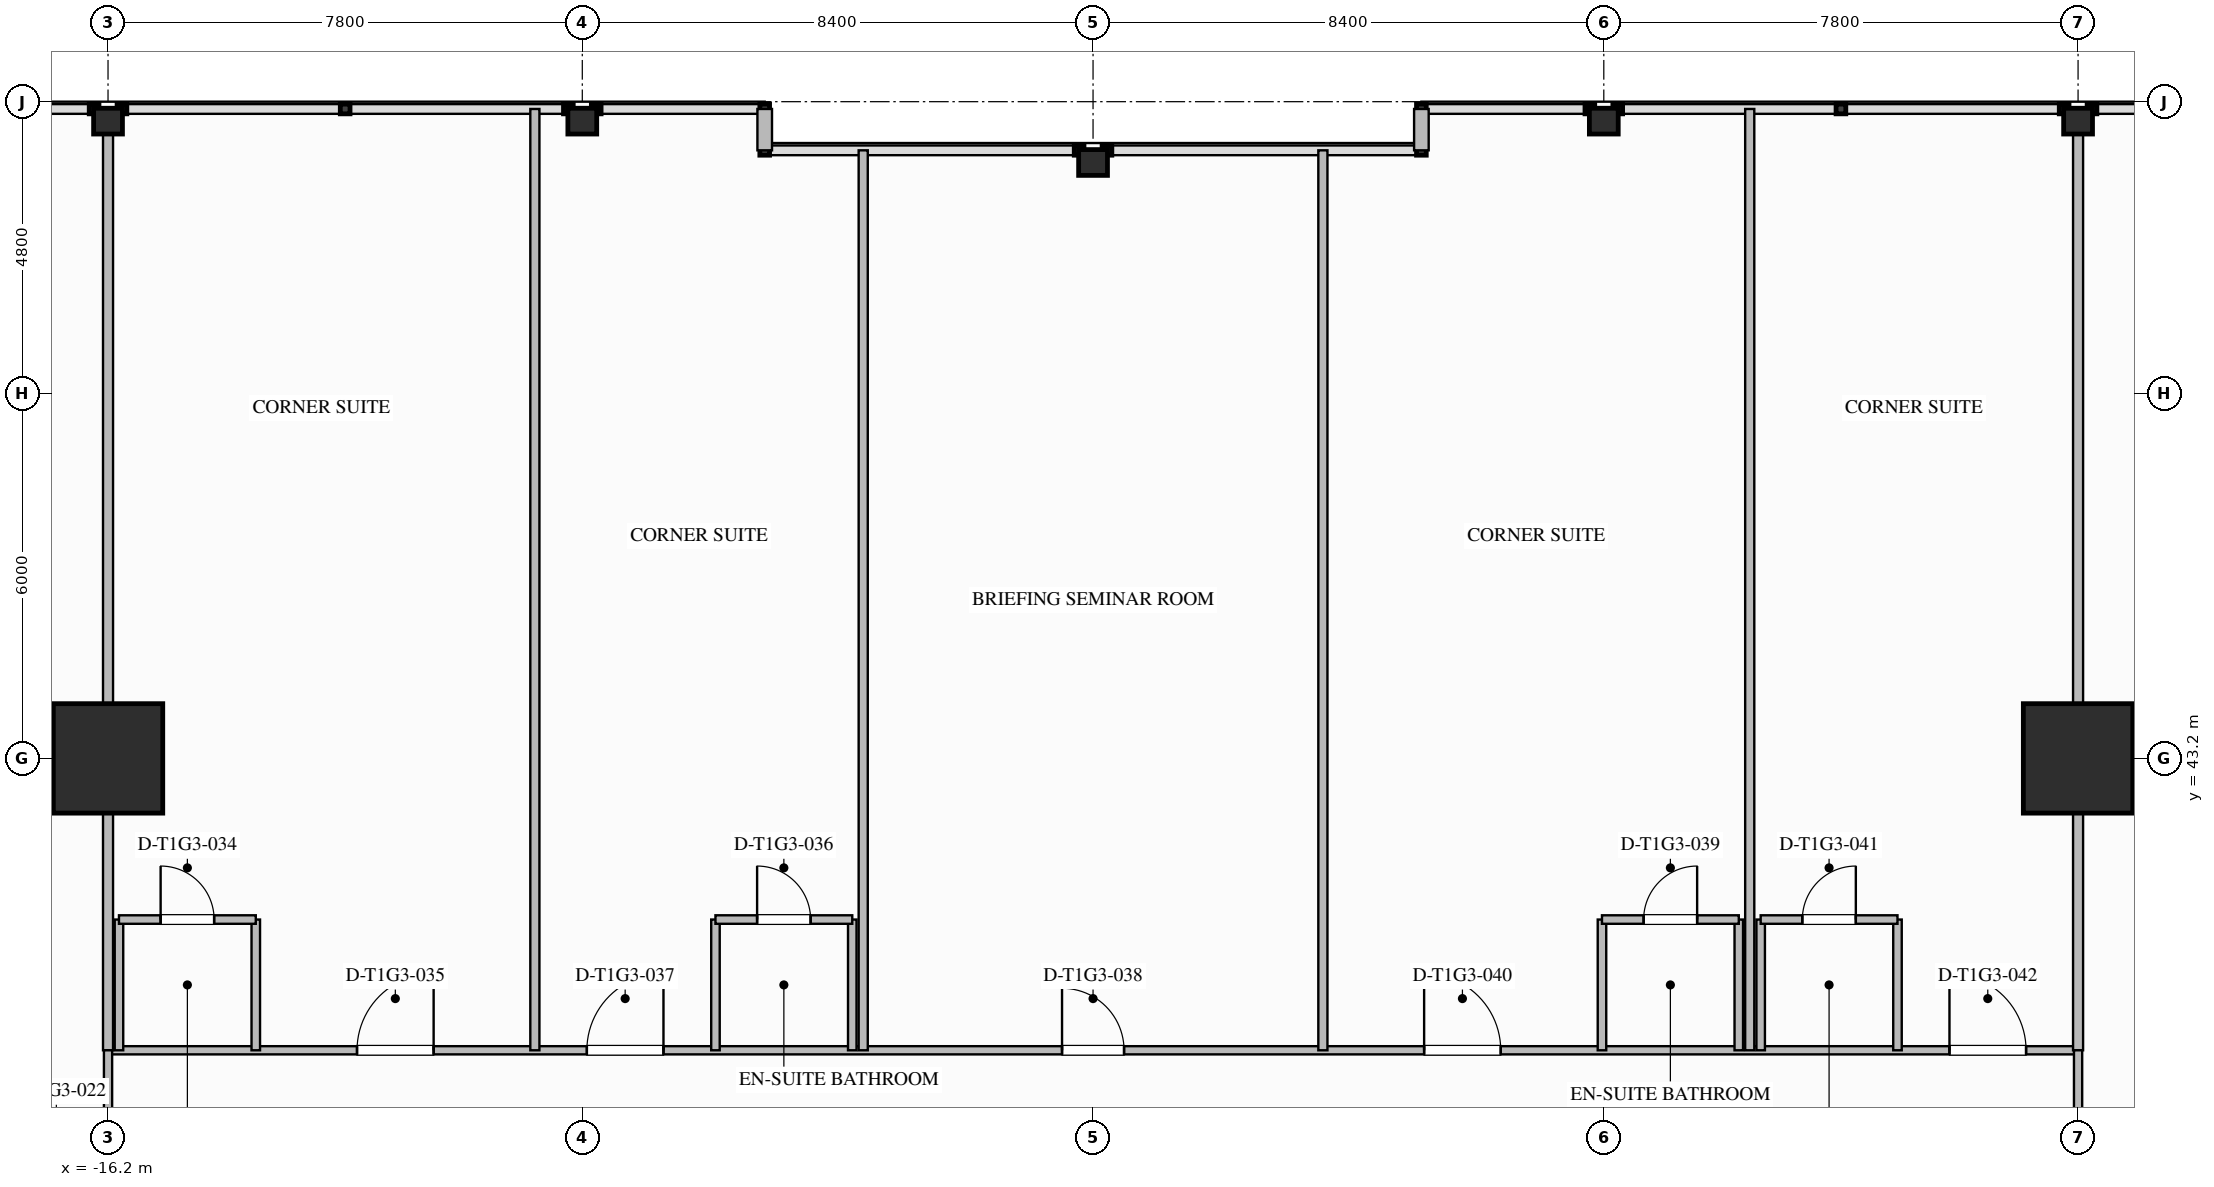
"""IFC4 building model, lengths in metres.
Left out: names, types, materials, properties, quantities, classifications, styles, units other than length and angle.
Written with IfcOpenShell. Run it as: python <this file> out.ifc"""

import sys

from ifc_helpers import new_model, si_unit, direction, frame, frame_2d, origin, origin_2d, place, context, subcontext, project, spatial, rectangle, i_section, extrude, element, fill, save


model = new_model("IFC4")
c1 = context("Model", 3, precision=1e-05, world=origin(), true_north=direction((0.0, 1.0)))
c2 = subcontext(c1, "Body", "Model", "MODEL_VIEW")
j1 = project(units=[si_unit("LENGTHUNIT", "METRE"), si_unit("PLANEANGLEUNIT", "RADIAN")], contexts=[c1])
p1 = place(None, origin())
s1 = spatial("IfcSite", under=j1, at=p1, CompositionType="ELEMENT")
p2 = place(p1, origin())
s2 = spatial("IfcBuilding", under=s1, at=p2, CompositionType="ELEMENT")
p3 = place(p2, frame((0.0, 0.0, 61.2)))
s3 = spatial("IfcBuildingStorey", under=s2, at=p3, CompositionType="ELEMENT", Elevation=61.2)
for number, where, z_axis, x_axis in (
    (1, (-16.2, 43.2, 0.0), (0.0, 0.0, 1.0), (1.0, 0.0, 0.0)),
    (2, (16.2, 43.2, 0.0), (0.0, 0.0, 1.0), (1.0, 0.0, 0.0)),
):
    element("IfcColumn", number, at=place(p3, frame(where, z_axis=z_axis, x_axis=x_axis)), inside=s3, PredefinedType="COLUMN", context=c2, shape_type="SweptSolid", body=[
        extrude(rectangle(XDim=1.8, YDim=1.8, at=origin_2d()), origin(), (0.0, 0.0, 1.0), 3.5),
    ])
for number, where, z_axis, x_axis in (
    (3, (-16.2, 53.68, 0.0), (0.0, 0.0, 1.0), (0.0, 1.0, 0.0)),
    (4, (-8.4, 53.68, 0.0), (0.0, 0.0, 1.0), (0.0, 1.0, 0.0)),
    (5, (0.0, 53.0, 0.0), (0.0, 0.0, 1.0), (0.0, 1.0, 0.0)),
    (6, (8.4, 53.68, 0.0), (0.0, 0.0, 1.0), (0.0, 1.0, 0.0)),
    (7, (16.2, 53.68, 0.0), (0.0, 0.0, 1.0), (0.0, 1.0, 0.0)),
):
    element("IfcColumn", number, at=place(p3, frame(where, z_axis=z_axis, x_axis=x_axis)), inside=s3, PredefinedType="COLUMN", context=c2, shape_type="SweptSolid", body=[
        extrude(i_section(OverallWidth=0.424, OverallDepth=0.474, WebThickness=0.048, FlangeThickness=0.077, FilletRadius=0.03, at=origin_2d()), origin(), (0.0, 0.0, 1.0), 3.497),
    ])
for number, where, z_axis, x_axis in (
    (8, (-5.4, 53.88, 0.0), (0.0, 0.0, 1.0), (0.0, -1.0, 0.0)),
    (9, (5.4, 53.2, 0.0), (0.0, 0.0, 1.0), (0.0, 1.0, 0.0)),
):
    element("IfcWall", number, at=place(p3, frame(where, z_axis=z_axis, x_axis=x_axis)), inside=s3, PredefinedType="STANDARD", context=c2, shape_type="SweptSolid", body=[
        extrude(rectangle(XDim=0.68, YDim=0.24, at=frame_2d((0.34, 0.0))), origin(), (0.0, 0.0, 1.0), 3.24),
    ])
p4 = place(p3, frame((-16.2, 38.4, 0.0), z_axis=(0.0, 0.0, 1.0), x_axis=(1.0, 0.0, 0.0)))
e10 = element("IfcWall", 10, at=p4, inside=s3, PredefinedType="PARTITIONING", context=c2, shape_type="SweptSolid", body=[
    extrude(rectangle(XDim=32.4, YDim=0.135, at=frame_2d((16.2, 0.0))), origin(), (0.0, 0.0, 1.0), 3.24),
])
p5 = place(p4, frame((4.095, 0.0, 0.0)))
e11 = element("IfcOpeningElement", 11, at=p5, cuts=e10, PredefinedType="OPENING", context=c2, shape_type="SweptSolid", body=[
    extrude(rectangle(XDim=1.26, YDim=2.2, at=frame_2d((0.63, 1.1))), frame((0.0, 0.077, 0.0), z_axis=(0.0, -1.0, 0.0), x_axis=(1.0, 0.0, 0.0)), (0.0, 0.0, 1.0), 0.155),
])
p6 = place(p4, frame((7.875, 0.0, 0.0)))
e12 = element("IfcOpeningElement", 12, at=p6, cuts=e10, PredefinedType="OPENING", context=c2, shape_type="SweptSolid", body=[
    extrude(rectangle(XDim=1.26, YDim=2.2, at=frame_2d((0.63, 1.1))), frame((0.0, 0.077, 0.0), z_axis=(0.0, -1.0, 0.0), x_axis=(1.0, 0.0, 0.0)), (0.0, 0.0, 1.0), 0.155),
])
p7 = place(p4, frame((15.69, 0.0, 0.0)))
e13 = element("IfcOpeningElement", 13, at=p7, cuts=e10, PredefinedType="OPENING", context=c2, shape_type="SweptSolid", body=[
    extrude(rectangle(XDim=1.02, YDim=2.15, at=frame_2d((0.51, 1.075))), frame((0.0, 0.077, 0.0), z_axis=(0.0, -1.0, 0.0), x_axis=(1.0, 0.0, 0.0)), (0.0, 0.0, 1.0), 0.155),
])
p8 = place(p4, frame((21.645, 0.0, 0.0)))
e14 = element("IfcOpeningElement", 14, at=p8, cuts=e10, PredefinedType="OPENING", context=c2, shape_type="SweptSolid", body=[
    extrude(rectangle(XDim=1.26, YDim=2.2, at=frame_2d((0.63, 1.1))), frame((0.0, 0.077, 0.0), z_axis=(0.0, -1.0, 0.0), x_axis=(1.0, 0.0, 0.0)), (0.0, 0.0, 1.0), 0.155),
])
p9 = place(p4, frame((30.285, 0.0, 0.0)))
e15 = element("IfcOpeningElement", 15, at=p9, cuts=e10, PredefinedType="OPENING", context=c2, shape_type="SweptSolid", body=[
    extrude(rectangle(XDim=1.26, YDim=2.2, at=frame_2d((0.63, 1.1))), frame((0.0, 0.077, 0.0), z_axis=(0.0, -1.0, 0.0), x_axis=(1.0, 0.0, 0.0)), (0.0, 0.0, 1.0), 0.155),
])
for number, where, z_axis, x_axis in (
    (16, (-16.2, 38.4, 0.0), (0.0, 0.0, 1.0), (0.0, 1.0, 0.0)),
    (17, (16.2, 38.4, 0.0), (0.0, 0.0, 1.0), (0.0, 1.0, 0.0)),
):
    element("IfcWall", number, at=place(p3, frame(where, z_axis=z_axis, x_axis=x_axis)), inside=s3, PredefinedType="PARTITIONING", context=c2, shape_type="SweptSolid", body=[
        extrude(rectangle(XDim=15.48, YDim=0.165, at=frame_2d((7.74, 0.0))), origin(), (0.0, 0.0, 1.0), 2.452),
    ])
p10 = place(p3, frame((-16.2, 35.7, 0.0), z_axis=(0.0, 0.0, 1.0), x_axis=(0.0, 1.0, 0.0)))
e18 = element("IfcWall", 18, at=p10, inside=s3, PredefinedType="PARTITIONING", context=c2, shape_type="SweptSolid", body=[
    extrude(rectangle(XDim=2.7, YDim=0.135, at=frame_2d((1.35, 0.0))), origin(), (0.0, 0.0, 1.0), 2.452),
])
p11 = place(p10, frame((0.52, 0.0, 0.0)))
e19 = element("IfcOpeningElement", 19, at=p11, cuts=e18, PredefinedType="OPENING", context=c2, shape_type="SweptSolid", body=[
    extrude(rectangle(XDim=1.02, YDim=2.15, at=frame_2d((0.51, 1.075))), frame((0.0, 0.077, 0.0), z_axis=(0.0, -1.0, 0.0), x_axis=(1.0, 0.0, 0.0)), (0.0, 0.0, 1.0), 0.155),
])
p12 = place(p3, frame((16.2, 35.7, 0.0), z_axis=(0.0, 0.0, 1.0), x_axis=(0.0, 1.0, 0.0)))
e20 = element("IfcWall", 20, at=p12, inside=s3, PredefinedType="PARTITIONING", context=c2, shape_type="SweptSolid", body=[
    extrude(rectangle(XDim=2.7, YDim=0.135, at=frame_2d((1.35, 0.0))), origin(), (0.0, 0.0, 1.0), 2.452),
])
p13 = place(p12, frame((0.52, 0.0, 0.0)))
e21 = element("IfcOpeningElement", 21, at=p13, cuts=e20, PredefinedType="OPENING", context=c2, shape_type="SweptSolid", body=[
    extrude(rectangle(XDim=1.02, YDim=2.15, at=frame_2d((0.51, 1.075))), frame((0.0, 0.077, 0.0), z_axis=(0.0, -1.0, 0.0), x_axis=(1.0, 0.0, 0.0)), (0.0, 0.0, 1.0), 0.155),
])
p14 = place(p3, frame((-16.02, 38.4, 0.0), z_axis=(0.0, 0.0, 1.0), x_axis=(0.0, 1.0, 0.0)))
e22 = element("IfcWall", 22, at=p14, inside=s3, PredefinedType="PLUMBINGWALL", context=c2, shape_type="SweptSolid", body=[
    extrude(rectangle(XDim=2.15, YDim=0.14, at=frame_2d((1.075, 0.0))), origin(), (0.0, 0.0, 1.0), 2.452),
])
p15 = place(p3, frame((-13.77, 38.4, 0.0), z_axis=(0.0, 0.0, 1.0), x_axis=(0.0, 1.0, 0.0)))
e23 = element("IfcWall", 23, at=p15, inside=s3, PredefinedType="PLUMBINGWALL", context=c2, shape_type="SweptSolid", body=[
    extrude(rectangle(XDim=2.15, YDim=0.14, at=frame_2d((1.075, 0.0))), origin(), (0.0, 0.0, 1.0), 3.24),
])
p16 = place(p3, frame((-16.02, 40.55, 0.0), z_axis=(0.0, 0.0, 1.0), x_axis=(1.0, 0.0, 0.0)))
e24 = element("IfcWall", 24, at=p16, inside=s3, PredefinedType="PLUMBINGWALL", context=c2, shape_type="SweptSolid", body=[
    extrude(rectangle(XDim=2.25, YDim=0.14, at=frame_2d((1.125, 0.0))), origin(), (0.0, 0.0, 1.0), 3.24),
])
p17 = place(p16, frame((0.685, 0.0, 0.0)))
e25 = element("IfcOpeningElement", 25, at=p17, cuts=e24, PredefinedType="OPENING", context=c2, shape_type="SweptSolid", body=[
    extrude(rectangle(XDim=0.88, YDim=2.1, at=frame_2d((0.44, 1.05))), frame((0.0, 0.08, 0.0), z_axis=(0.0, -1.0, 0.0), x_axis=(1.0, 0.0, 0.0)), (0.0, 0.0, 1.0), 0.16),
])
p18 = place(p3, frame((-9.18, 38.4, 0.0), z_axis=(0.0, 0.0, 1.0), x_axis=(0.0, 1.0, 0.0)))
e26 = element("IfcWall", 26, at=p18, inside=s3, PredefinedType="PARTITIONING", context=c2, shape_type="SweptSolid", body=[
    extrude(rectangle(XDim=15.48, YDim=0.15, at=frame_2d((7.74, 0.0))), origin(), (0.0, 0.0, 1.0), 3.24),
])
for number, where, z_axis, x_axis in (
    (27, (-6.21, 38.4, 0.0), (0.0, 0.0, 1.0), (0.0, 1.0, 0.0)),
    (28, (-3.96, 38.4, 0.0), (0.0, 0.0, 1.0), (0.0, 1.0, 0.0)),
):
    element("IfcWall", number, at=place(p3, frame(where, z_axis=z_axis, x_axis=x_axis)), inside=s3, PredefinedType="PLUMBINGWALL", context=c2, shape_type="SweptSolid", body=[
        extrude(rectangle(XDim=2.15, YDim=0.14, at=frame_2d((1.075, 0.0))), origin(), (0.0, 0.0, 1.0), 3.24),
    ])
p19 = place(p3, frame((-6.21, 40.55, 0.0), z_axis=(0.0, 0.0, 1.0), x_axis=(1.0, 0.0, 0.0)))
e29 = element("IfcWall", 29, at=p19, inside=s3, PredefinedType="PLUMBINGWALL", context=c2, shape_type="SweptSolid", body=[
    extrude(rectangle(XDim=2.25, YDim=0.14, at=frame_2d((1.125, 0.0))), origin(), (0.0, 0.0, 1.0), 3.24),
])
p20 = place(p19, frame((0.685, 0.0, 0.0)))
e30 = element("IfcOpeningElement", 30, at=p20, cuts=e29, PredefinedType="OPENING", context=c2, shape_type="SweptSolid", body=[
    extrude(rectangle(XDim=0.88, YDim=2.1, at=frame_2d((0.44, 1.05))), frame((0.0, 0.08, 0.0), z_axis=(0.0, -1.0, 0.0), x_axis=(1.0, 0.0, 0.0)), (0.0, 0.0, 1.0), 0.16),
])
for number, where, z_axis, x_axis in (
    (31, (-3.78, 38.4, 0.0), (0.0, 0.0, 1.0), (0.0, 1.0, 0.0)),
    (32, (3.78, 38.4, 0.0), (0.0, 0.0, 1.0), (0.0, 1.0, 0.0)),
):
    element("IfcWall", number, at=place(p3, frame(where, z_axis=z_axis, x_axis=x_axis)), inside=s3, PredefinedType="PARTITIONING", context=c2, shape_type="SweptSolid", body=[
        extrude(rectangle(XDim=14.8, YDim=0.15, at=frame_2d((7.4, 0.0))), origin(), (0.0, 0.0, 1.0), 3.24),
    ])
p21 = place(p3, frame((8.37, 38.4, 0.0), z_axis=(0.0, 0.0, 1.0), x_axis=(0.0, 1.0, 0.0)))
e33 = element("IfcWall", 33, at=p21, inside=s3, PredefinedType="PLUMBINGWALL", context=c2, shape_type="SweptSolid", body=[
    extrude(rectangle(XDim=2.15, YDim=0.14, at=frame_2d((1.075, 0.0))), origin(), (0.0, 0.0, 1.0), 2.617),
])
p22 = place(p3, frame((10.62, 38.4, 0.0), z_axis=(0.0, 0.0, 1.0), x_axis=(0.0, 1.0, 0.0)))
e34 = element("IfcWall", 34, at=p22, inside=s3, PredefinedType="PLUMBINGWALL", context=c2, shape_type="SweptSolid", body=[
    extrude(rectangle(XDim=2.15, YDim=0.14, at=frame_2d((1.075, 0.0))), origin(), (0.0, 0.0, 1.0), 3.24),
])
p23 = place(p3, frame((8.37, 40.55, 0.0), z_axis=(0.0, 0.0, 1.0), x_axis=(1.0, 0.0, 0.0)))
e35 = element("IfcWall", 35, at=p23, inside=s3, PredefinedType="PLUMBINGWALL", context=c2, shape_type="SweptSolid", body=[
    extrude(rectangle(XDim=2.25, YDim=0.14, at=frame_2d((1.125, 0.0))), origin(), (0.0, 0.0, 1.0), 3.24),
])
p24 = place(p23, frame((0.685, 0.0, 0.0)))
e36 = element("IfcOpeningElement", 36, at=p24, cuts=e35, PredefinedType="OPENING", context=c2, shape_type="SweptSolid", body=[
    extrude(rectangle(XDim=0.88, YDim=2.1, at=frame_2d((0.44, 1.05))), frame((0.0, 0.08, 0.0), z_axis=(0.0, -1.0, 0.0), x_axis=(1.0, 0.0, 0.0)), (0.0, 0.0, 1.0), 0.16),
])
p25 = place(p3, frame((10.8, 38.4, 0.0), z_axis=(0.0, 0.0, 1.0), x_axis=(0.0, 1.0, 0.0)))
e37 = element("IfcWall", 37, at=p25, inside=s3, PredefinedType="PARTITIONING", context=c2, shape_type="SweptSolid", body=[
    extrude(rectangle(XDim=15.48, YDim=0.15, at=frame_2d((7.74, 0.0))), origin(), (0.0, 0.0, 1.0), 3.24),
])
for number, where, z_axis, x_axis in (
    (38, (10.98, 38.4, 0.0), (0.0, 0.0, 1.0), (0.0, 1.0, 0.0)),
    (39, (13.23, 38.4, 0.0), (0.0, 0.0, 1.0), (0.0, 1.0, 0.0)),
):
    element("IfcWall", number, at=place(p3, frame(where, z_axis=z_axis, x_axis=x_axis)), inside=s3, PredefinedType="PLUMBINGWALL", context=c2, shape_type="SweptSolid", body=[
        extrude(rectangle(XDim=2.15, YDim=0.14, at=frame_2d((1.075, 0.0))), origin(), (0.0, 0.0, 1.0), 3.24),
    ])
p26 = place(p3, frame((10.98, 40.55, 0.0), z_axis=(0.0, 0.0, 1.0), x_axis=(1.0, 0.0, 0.0)))
e40 = element("IfcWall", 40, at=p26, inside=s3, PredefinedType="PLUMBINGWALL", context=c2, shape_type="SweptSolid", body=[
    extrude(rectangle(XDim=2.25, YDim=0.14, at=frame_2d((1.125, 0.0))), origin(), (0.0, 0.0, 1.0), 3.24),
])
p27 = place(p26, frame((0.685, 0.0, 0.0)))
e41 = element("IfcOpeningElement", 41, at=p27, cuts=e40, PredefinedType="OPENING", context=c2, shape_type="SweptSolid", body=[
    extrude(rectangle(XDim=0.88, YDim=2.1, at=frame_2d((0.44, 1.05))), frame((0.0, 0.08, 0.0), z_axis=(0.0, -1.0, 0.0), x_axis=(1.0, 0.0, 0.0)), (0.0, 0.0, 1.0), 0.16),
])
p28 = place(p17, origin())
e42 = element("IfcDoor", 42, at=p28, inside=s3, OperationType="SINGLE_SWING_LEFT", PredefinedType="DOOR", context=c2, shape_type="SweptSolid", body=[
    extrude(rectangle(XDim=0.88, YDim=2.1, at=frame_2d((0.44, 1.05))), frame((0.0, 0.025, 0.0), z_axis=(0.0, -1.0, 0.0), x_axis=(1.0, 0.0, 0.0)), (0.0, 0.0, 1.0), 0.05),
])
fill(e25, e42)
p29 = place(p5, origin())
e43 = element("IfcDoor", 43, at=p29, inside=s3, OperationType="SINGLE_SWING_RIGHT", PredefinedType="DOOR", context=c2, shape_type="SweptSolid", body=[
    extrude(rectangle(XDim=1.26, YDim=2.2, at=frame_2d((0.63, 1.1))), frame((0.0, 0.025, 0.0), z_axis=(0.0, -1.0, 0.0), x_axis=(1.0, 0.0, 0.0)), (0.0, 0.0, 1.0), 0.05),
])
fill(e11, e43)
p30 = place(p20, origin())
e44 = element("IfcDoor", 44, at=p30, inside=s3, OperationType="SINGLE_SWING_LEFT", PredefinedType="DOOR", context=c2, shape_type="SweptSolid", body=[
    extrude(rectangle(XDim=0.88, YDim=2.1, at=frame_2d((0.44, 1.05))), frame((0.0, 0.025, 0.0), z_axis=(0.0, -1.0, 0.0), x_axis=(1.0, 0.0, 0.0)), (0.0, 0.0, 1.0), 0.05),
])
fill(e30, e44)
p31 = place(p6, origin())
e45 = element("IfcDoor", 45, at=p31, inside=s3, OperationType="SINGLE_SWING_RIGHT", PredefinedType="DOOR", context=c2, shape_type="SweptSolid", body=[
    extrude(rectangle(XDim=1.26, YDim=2.2, at=frame_2d((0.63, 1.1))), frame((0.0, 0.025, 0.0), z_axis=(0.0, -1.0, 0.0), x_axis=(1.0, 0.0, 0.0)), (0.0, 0.0, 1.0), 0.05),
])
fill(e12, e45)
p32 = place(p7, origin())
e46 = element("IfcDoor", 46, at=p32, inside=s3, OperationType="SINGLE_SWING_LEFT", PredefinedType="DOOR", context=c2, shape_type="SweptSolid", body=[
    extrude(rectangle(XDim=1.02, YDim=2.15, at=frame_2d((0.51, 1.075))), frame((0.0, 0.025, 0.0), z_axis=(0.0, -1.0, 0.0), x_axis=(1.0, 0.0, 0.0)), (0.0, 0.0, 1.0), 0.05),
])
fill(e13, e46)
p33 = place(p24, origin())
e47 = element("IfcDoor", 47, at=p33, inside=s3, OperationType="SINGLE_SWING_RIGHT", PredefinedType="DOOR", context=c2, shape_type="SweptSolid", body=[
    extrude(rectangle(XDim=0.88, YDim=2.1, at=frame_2d((0.44, 1.05))), frame((0.0, 0.025, 0.0), z_axis=(0.0, -1.0, 0.0), x_axis=(1.0, 0.0, 0.0)), (0.0, 0.0, 1.0), 0.05),
])
fill(e36, e47)
p34 = place(p8, origin())
e48 = element("IfcDoor", 48, at=p34, inside=s3, OperationType="SINGLE_SWING_LEFT", PredefinedType="DOOR", context=c2, shape_type="SweptSolid", body=[
    extrude(rectangle(XDim=1.26, YDim=2.2, at=frame_2d((0.63, 1.1))), frame((0.0, 0.025, 0.0), z_axis=(0.0, -1.0, 0.0), x_axis=(1.0, 0.0, 0.0)), (0.0, 0.0, 1.0), 0.05),
])
fill(e14, e48)
p35 = place(p27, origin())
e49 = element("IfcDoor", 49, at=p35, inside=s3, OperationType="SINGLE_SWING_RIGHT", PredefinedType="DOOR", context=c2, shape_type="SweptSolid", body=[
    extrude(rectangle(XDim=0.88, YDim=2.1, at=frame_2d((0.44, 1.05))), frame((0.0, 0.025, 0.0), z_axis=(0.0, -1.0, 0.0), x_axis=(1.0, 0.0, 0.0)), (0.0, 0.0, 1.0), 0.05),
])
fill(e41, e49)
p36 = place(p9, origin())
e50 = element("IfcDoor", 50, at=p36, inside=s3, OperationType="SINGLE_SWING_LEFT", PredefinedType="DOOR", context=c2, shape_type="SweptSolid", body=[
    extrude(rectangle(XDim=1.26, YDim=2.2, at=frame_2d((0.63, 1.1))), frame((0.0, 0.025, 0.0), z_axis=(0.0, -1.0, 0.0), x_axis=(1.0, 0.0, 0.0)), (0.0, 0.0, 1.0), 0.05),
])
fill(e15, e50)
save(model, sys.argv[1])
